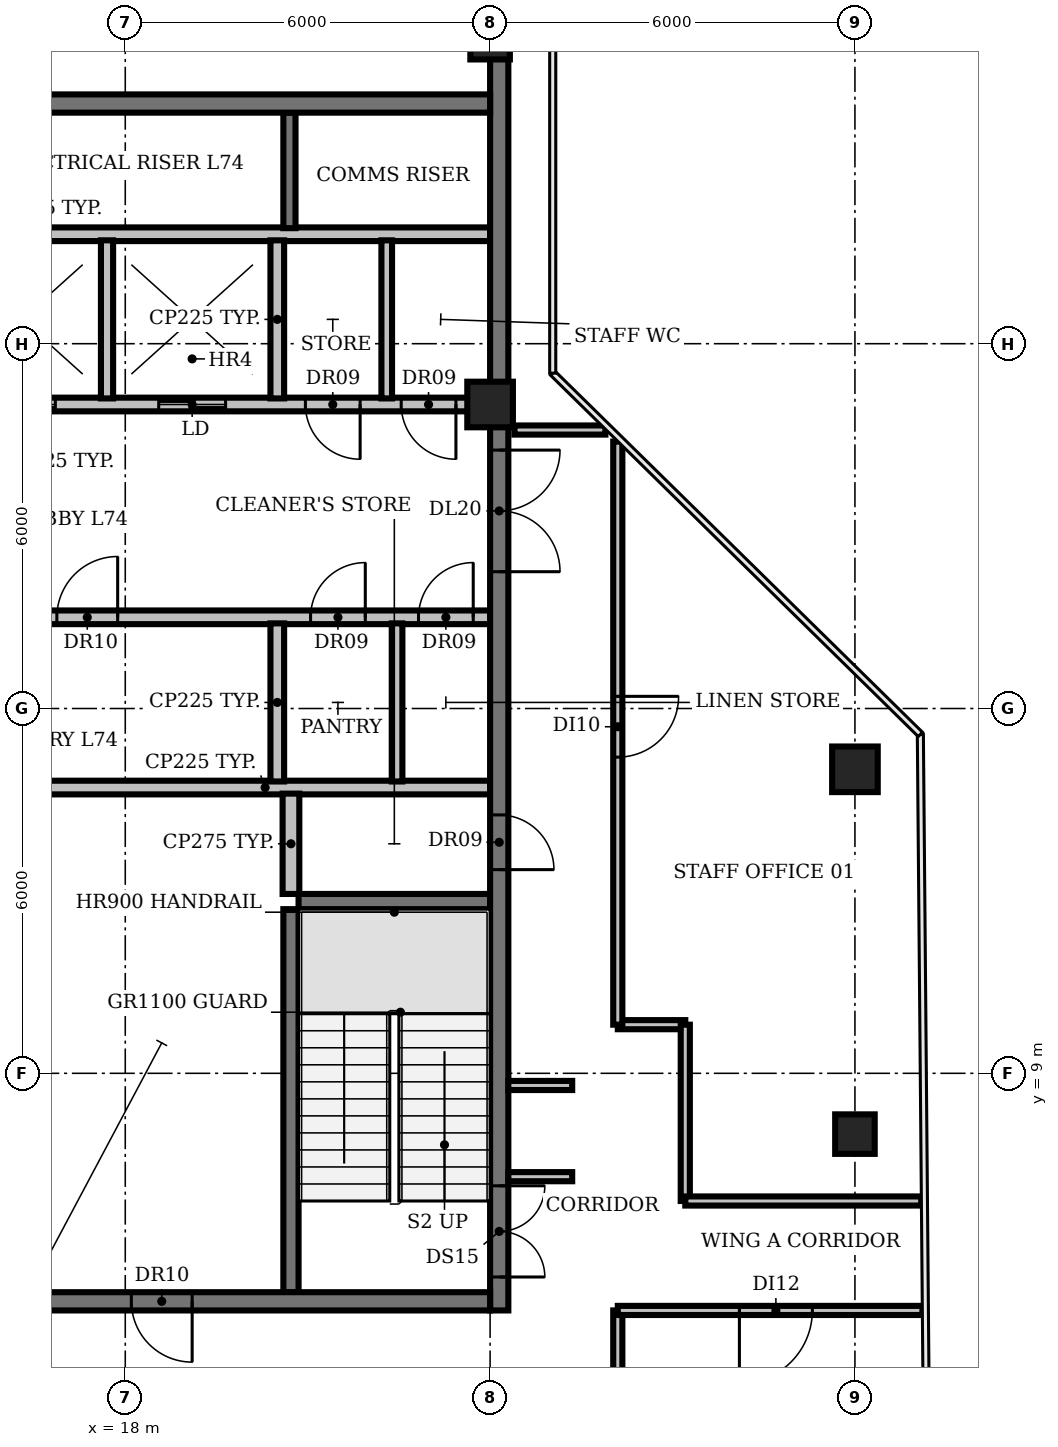
"""IFC4 building model, lengths in metres.
Left out: names, types, materials, properties, quantities, classifications, styles, units other than length and angle.
Written with IfcOpenShell. Run it as: python <this file> out.ifc"""

import sys

from ifc_helpers import new_model, si_unit, direction, frame, frame_2d, origin, origin_2d, place, context, subcontext, project, spatial, rectangle, circle, extrude, element, fill, save


model = new_model("IFC4")
c1 = context("Model", 3, precision=1e-05, world=origin(), true_north=direction((0.0, 1.0)))
c2 = subcontext(c1, "Body", "Model", "MODEL_VIEW")
j1 = project(units=[si_unit("LENGTHUNIT", "METRE"), si_unit("PLANEANGLEUNIT", "RADIAN")], contexts=[c1])
p1 = place(None, origin())
s1 = spatial("IfcSite", under=j1, at=p1, CompositionType="ELEMENT")
p2 = place(p1, origin())
s2 = spatial("IfcBuilding", under=s1, at=p2, CompositionType="ELEMENT")
p3 = place(p2, frame((0.0, 0.0, 331.4)))
s3 = spatial("IfcBuildingStorey", under=s2, at=p3, CompositionType="ELEMENT", Elevation=331.4)
p4 = place(p3, frame((24.0, 20.0, 0.0), z_axis=(0.0, 0.0, 1.0), x_axis=(1.0, 0.0, 0.0)))
e1 = element("IfcColumn", 1, at=p4, inside=s3, PredefinedType="COLUMN", context=c2, shape_type="SweptSolid", body=[
    extrude(circle(Radius=0.375, at=origin_2d()), origin(), (0.0, 0.0, 1.0), 3.9),
])
for number, where, z_axis, x_axis in (
    (2, (24.0, 26.0, 0.0), (0.0, 0.0, 1.0), (1.0, 0.0, 0.0)),
    (3, (30.0, 8.0, 0.0), (0.0, 0.0, 1.0), (1.0, 0.0, 0.0)),
):
    element("IfcColumn", number, at=place(p3, frame(where, z_axis=z_axis, x_axis=x_axis)), inside=s3, PredefinedType="COLUMN", context=c2, shape_type="SweptSolid", body=[
        extrude(rectangle(XDim=0.65, YDim=0.65, at=origin_2d()), origin(), (0.0, 0.0, 1.0), 3.9),
    ])
p5 = place(p3, frame((30.0, 14.0, 0.0), z_axis=(0.0, 0.0, 1.0), x_axis=(1.0, 0.0, 0.0)))
e4 = element("IfcColumn", 4, at=p5, inside=s3, PredefinedType="COLUMN", context=c2, shape_type="SweptSolid", body=[
    extrude(circle(Radius=0.375, at=origin_2d()), origin(), (0.0, 0.0, 1.0), 3.9),
])
p6 = place(p3, frame((20.85, 11.825, 0.0), z_axis=(0.0, 0.0, 1.0), x_axis=(1.0, 0.0, 0.0)))
e5 = element("IfcWall", 5, at=p6, inside=s3, PredefinedType="SHEAR", context=c2, shape_type="SweptSolid", body=[
    extrude(rectangle(XDim=3.15, YDim=0.25, at=frame_2d((1.575, 0.0))), origin(), (0.0, 0.0, 1.0), 3.9),
])
p7 = place(p3, frame((16.6, 13.7, 0.0), z_axis=(0.0, 0.0, 1.0), x_axis=(1.0, 0.0, 0.0)))
e6 = element("IfcWall", 6, at=p7, inside=s3, PredefinedType="PARTITIONING", context=c2, shape_type="SweptSolid", body=[
    extrude(rectangle(XDim=7.4, YDim=0.225, at=frame_2d((3.7, 0.0))), origin(), (0.0, 0.0, 1.0), 3.9),
])
p8 = place(p3, frame((9.4, 16.5, 0.0), z_axis=(0.0, 0.0, 1.0), x_axis=(1.0, 0.0, 0.0)))
e7 = element("IfcWall", 7, at=p8, inside=s3, PredefinedType="PARTITIONING", context=c2, shape_type="SweptSolid", body=[
    extrude(rectangle(XDim=14.6, YDim=0.225, at=frame_2d((7.3, 0.0))), origin(), (0.0, 0.0, 1.0), 3.9),
])
p9 = place(p8, frame((1.9, 0.0, 0.0)))
e8 = element("IfcOpeningElement", 8, at=p9, cuts=e7, PredefinedType="OPENING", context=c2, shape_type="SweptSolid", body=[
    extrude(rectangle(XDim=1.0, YDim=2.1, at=frame_2d((0.5, 1.05))), frame((0.0, 0.123, 0.0), z_axis=(0.0, -1.0, 0.0), x_axis=(1.0, 0.0, 0.0)), (0.0, 0.0, 1.0), 0.245),
])
p10 = place(p8, frame((7.475, 0.0, 0.0)))
e9 = element("IfcOpeningElement", 9, at=p10, cuts=e7, PredefinedType="OPENING", context=c2, shape_type="SweptSolid", body=[
    extrude(rectangle(XDim=1.0, YDim=2.1, at=frame_2d((0.5, 1.05))), frame((0.0, 0.123, 0.0), z_axis=(0.0, -1.0, 0.0), x_axis=(1.0, 0.0, 0.0)), (0.0, 0.0, 1.0), 0.245),
])
p11 = place(p8, frame((11.647, 0.0, 0.0)))
e10 = element("IfcOpeningElement", 10, at=p11, cuts=e7, PredefinedType="OPENING", context=c2, shape_type="SweptSolid", body=[
    extrude(rectangle(XDim=0.9, YDim=2.1, at=frame_2d((0.45, 1.05))), frame((0.0, 0.123, 0.0), z_axis=(0.0, -1.0, 0.0), x_axis=(1.0, 0.0, 0.0)), (0.0, 0.0, 1.0), 0.245),
])
p12 = place(p8, frame((13.423, 0.0, 0.0)))
e11 = element("IfcOpeningElement", 11, at=p12, cuts=e7, PredefinedType="OPENING", context=c2, shape_type="SweptSolid", body=[
    extrude(rectangle(XDim=0.9, YDim=2.1, at=frame_2d((0.45, 1.05))), frame((0.0, 0.123, 0.0), z_axis=(0.0, -1.0, 0.0), x_axis=(1.0, 0.0, 0.0)), (0.0, 0.0, 1.0), 0.245),
])
p13 = place(p3, frame((24.0, 20.0, 0.0), z_axis=(0.0, 0.0, 1.0), x_axis=(-1.0, 0.0, 0.0)))
e12 = element("IfcWall", 12, at=p13, inside=s3, PredefinedType="PARTITIONING", context=c2, shape_type="SweptSolid", body=[
    extrude(rectangle(XDim=14.6, YDim=0.225, at=frame_2d((7.3, 0.0))), origin(), (0.0, 0.0, 1.0), 3.9),
])
p14 = place(p13, frame((12.75, 0.0, 0.0)))
e13 = element("IfcOpeningElement", 13, at=p14, cuts=e12, PredefinedType="OPENING", context=c2, shape_type="SweptSolid", body=[
    extrude(rectangle(XDim=1.1, YDim=2.1, at=frame_2d((0.55, 1.05))), frame((0.0, 0.123, 0.0), z_axis=(0.0, -1.0, 0.0), x_axis=(1.0, 0.0, 0.0)), (0.0, 0.0, 1.0), 0.245),
])
p15 = place(p13, frame((9.95, 0.0, 0.0)))
e14 = element("IfcOpeningElement", 14, at=p15, cuts=e12, PredefinedType="OPENING", context=c2, shape_type="SweptSolid", body=[
    extrude(rectangle(XDim=1.1, YDim=2.1, at=frame_2d((0.55, 1.05))), frame((0.0, 0.123, 0.0), z_axis=(0.0, -1.0, 0.0), x_axis=(1.0, 0.0, 0.0)), (0.0, 0.0, 1.0), 0.245),
])
p16 = place(p13, frame((7.15, 0.0, 0.0)))
e15 = element("IfcOpeningElement", 15, at=p16, cuts=e12, PredefinedType="OPENING", context=c2, shape_type="SweptSolid", body=[
    extrude(rectangle(XDim=1.1, YDim=2.1, at=frame_2d((0.55, 1.05))), frame((0.0, 0.123, 0.0), z_axis=(0.0, -1.0, 0.0), x_axis=(1.0, 0.0, 0.0)), (0.0, 0.0, 1.0), 0.245),
])
p17 = place(p13, frame((4.35, 0.0, 0.0)))
e16 = element("IfcOpeningElement", 16, at=p17, cuts=e12, PredefinedType="OPENING", context=c2, shape_type="SweptSolid", body=[
    extrude(rectangle(XDim=1.1, YDim=2.1, at=frame_2d((0.55, 1.05))), frame((0.0, 0.123, 0.0), z_axis=(0.0, -1.0, 0.0), x_axis=(1.0, 0.0, 0.0)), (0.0, 0.0, 1.0), 0.245),
])
p18 = place(p13, frame((2.137, 0.0, 0.0)))
e17 = element("IfcOpeningElement", 17, at=p18, cuts=e12, PredefinedType="OPENING", context=c2, shape_type="SweptSolid", body=[
    extrude(rectangle(XDim=0.9, YDim=2.1, at=frame_2d((0.45, 1.05))), frame((0.0, 0.123, 0.0), z_axis=(0.0, -1.0, 0.0), x_axis=(1.0, 0.0, 0.0)), (0.0, 0.0, 1.0), 0.245),
])
p19 = place(p13, frame((0.562, 0.0, 0.0)))
e18 = element("IfcOpeningElement", 18, at=p19, cuts=e12, PredefinedType="OPENING", context=c2, shape_type="SweptSolid", body=[
    extrude(rectangle(XDim=0.9, YDim=2.1, at=frame_2d((0.45, 1.05))), frame((0.0, 0.123, 0.0), z_axis=(0.0, -1.0, 0.0), x_axis=(1.0, 0.0, 0.0)), (0.0, 0.0, 1.0), 0.245),
])
p20 = place(p3, frame((9.4, 22.8, 0.0), z_axis=(0.0, 0.0, 1.0), x_axis=(1.0, 0.0, 0.0)))
e19 = element("IfcWall", 19, at=p20, inside=s3, PredefinedType="PARTITIONING", context=c2, shape_type="SweptSolid", body=[
    extrude(rectangle(XDim=14.6, YDim=0.225, at=frame_2d((7.3, 0.0))), origin(), (0.0, 0.0, 1.0), 3.9),
])
p21 = place(p3, frame((17.7, 20.1, 0.0), z_axis=(0.0, 0.0, 1.0), x_axis=(0.0, 1.0, 0.0)))
e20 = element("IfcWall", 20, at=p21, inside=s3, PredefinedType="SOLIDWALL", context=c2, shape_type="SweptSolid", body=[
    extrude(rectangle(XDim=2.6, YDim=0.2, at=frame_2d((1.3, 0.0))), origin(), (0.0, 0.0, 1.0), 3.9),
])
for number, where, z_axis, x_axis in (
    (21, (20.5, 13.8, 0.0), (0.0, 0.0, 1.0), (0.0, 1.0, 0.0)),
    (22, (20.5, 20.1, 0.0), (0.0, 0.0, 1.0), (0.0, 1.0, 0.0)),
):
    element("IfcWall", number, at=place(p3, frame(where, z_axis=z_axis, x_axis=x_axis)), inside=s3, PredefinedType="PARTITIONING", context=c2, shape_type="SweptSolid", body=[
        extrude(rectangle(XDim=2.6, YDim=0.225, at=frame_2d((1.3, 0.0))), origin(), (0.0, 0.0, 1.0), 3.9),
    ])
p22 = place(p3, frame((20.7, 22.9, 0.0), z_axis=(0.0, 0.0, 1.0), x_axis=(0.0, 1.0, 0.0)))
e23 = element("IfcWall", 23, at=p22, inside=s3, PredefinedType="SHEAR", context=c2, shape_type="SweptSolid", body=[
    extrude(rectangle(XDim=1.9, YDim=0.2, at=frame_2d((0.95, 0.0))), origin(), (0.0, 0.0, 1.0), 3.9),
])
p23 = place(p3, frame((20.725, 5.4, 0.0), z_axis=(0.0, 0.0, 1.0), x_axis=(0.0, 1.0, 0.0)))
e24 = element("IfcWall", 24, at=p23, inside=s3, PredefinedType="SHEAR", context=c2, shape_type="SweptSolid", body=[
    extrude(rectangle(XDim=6.3, YDim=0.25, at=frame_2d((3.15, 0.0))), origin(), (0.0, 0.0, 1.0), 3.9),
])
p24 = place(p3, frame((20.725, 11.95, 0.0), z_axis=(0.0, 0.0, 1.0), x_axis=(0.0, 1.0, 0.0)))
e25 = element("IfcWall", 25, at=p24, inside=s3, PredefinedType="PARTITIONING", context=c2, shape_type="SweptSolid", body=[
    extrude(rectangle(XDim=1.65, YDim=0.275, at=frame_2d((0.825, 0.0))), origin(), (0.0, 0.0, 1.0), 3.9),
])
for number, where, z_axis, x_axis in (
    (26, (22.3, 20.1, 0.0), (0.0, 0.0, 1.0), (0.0, 1.0, 0.0)),
    (27, (22.47, 13.8, 0.0), (0.0, 0.0, 1.0), (0.0, 1.0, 0.0)),
):
    element("IfcWall", number, at=place(p3, frame(where, z_axis=z_axis, x_axis=x_axis)), inside=s3, PredefinedType="PARTITIONING", context=c2, shape_type="SweptSolid", body=[
        extrude(rectangle(XDim=2.6, YDim=0.175, at=frame_2d((1.3, 0.0))), origin(), (0.0, 0.0, 1.0), 3.9),
    ])
p25 = place(p3, frame((24.15, 25.705, 0.0), z_axis=(0.0, 0.0, 1.0), x_axis=(0.0, -1.0, 0.0)))
e28 = element("IfcWall", 28, at=p25, inside=s3, PredefinedType="SHEAR", context=c2, shape_type="SweptSolid", body=[
    extrude(rectangle(XDim=20.605, YDim=0.3, at=frame_2d((10.302, 0.0))), origin(), (0.0, 0.0, 1.0), 3.9),
])
p26 = place(p25, frame((18.555, 0.0, 0.0)))
e29 = element("IfcOpeningElement", 29, at=p26, cuts=e28, PredefinedType="OPENING", context=c2, shape_type="SweptSolid", body=[
    extrude(rectangle(XDim=1.5, YDim=2.1, at=frame_2d((0.75, 1.05))), frame((0.0, 0.16, 0.0), z_axis=(0.0, -1.0, 0.0), x_axis=(1.0, 0.0, 0.0)), (0.0, 0.0, 1.0), 0.32),
])
p27 = place(p25, frame((12.455, 0.0, 0.0)))
e30 = element("IfcOpeningElement", 30, at=p27, cuts=e28, PredefinedType="OPENING", context=c2, shape_type="SweptSolid", body=[
    extrude(rectangle(XDim=0.9, YDim=2.1, at=frame_2d((0.45, 1.05))), frame((0.0, 0.16, 0.0), z_axis=(0.0, -1.0, 0.0), x_axis=(1.0, 0.0, 0.0)), (0.0, 0.0, 1.0), 0.32),
])
p28 = place(p25, frame((6.455, 0.0, 0.0)))
e31 = element("IfcOpeningElement", 31, at=p28, cuts=e28, PredefinedType="OPENING", context=c2, shape_type="SweptSolid", body=[
    extrude(rectangle(XDim=2.0, YDim=2.1, at=frame_2d((1.0, 1.05))), frame((0.0, 0.16, 0.0), z_axis=(0.0, -1.0, 0.0), x_axis=(1.0, 0.0, 0.0)), (0.0, 0.0, 1.0), 0.32),
])
p29 = place(p3, frame((24.0, 5.25, 0.0), z_axis=(0.0, 0.0, 1.0), x_axis=(-1.0, 0.0, 0.0)))
e32 = element("IfcWall", 32, at=p29, inside=s3, PredefinedType="SHEAR", context=c2, shape_type="SweptSolid", body=[
    extrude(rectangle(XDim=18.0, YDim=0.3, at=frame_2d((9.0, 0.0))), origin(), (0.0, 0.0, 1.0), 3.9),
])
p30 = place(p29, frame((13.0, 0.0, 0.0)))
e33 = element("IfcOpeningElement", 33, at=p30, cuts=e32, PredefinedType="OPENING", context=c2, shape_type="SweptSolid", body=[
    extrude(rectangle(XDim=1.2, YDim=2.1, at=frame_2d((0.6, 1.05))), frame((0.0, 0.16, 0.0), z_axis=(0.0, -1.0, 0.0), x_axis=(1.0, 0.0, 0.0)), (0.0, 0.0, 1.0), 0.32),
])
p31 = place(p29, frame((4.9, 0.0, 0.0)))
e34 = element("IfcOpeningElement", 34, at=p31, cuts=e32, PredefinedType="OPENING", context=c2, shape_type="SweptSolid", body=[
    extrude(rectangle(XDim=1.0, YDim=2.1, at=frame_2d((0.5, 1.05))), frame((0.0, 0.16, 0.0), z_axis=(0.0, -1.0, 0.0), x_axis=(1.0, 0.0, 0.0)), (0.0, 0.0, 1.0), 0.32),
])
p32 = place(p3, frame((6.0, 24.95, 0.0), z_axis=(0.0, 0.0, 1.0), x_axis=(1.0, 0.0, 0.0)))
e35 = element("IfcWall", 35, at=p32, inside=s3, PredefinedType="SHEAR", context=c2, shape_type="SweptSolid", body=[
    extrude(rectangle(XDim=18.0, YDim=0.3, at=frame_2d((9.0, 0.0))), origin(), (0.0, 0.0, 1.0), 3.9),
])
for number, where, z_axis, x_axis in (
    (36, (24.3, 7.3, 0.0), (0.0, 0.0, 1.0), (1.0, 0.0, 0.0)),
    (37, (24.3, 8.8, 0.0), (0.0, 0.0, 1.0), (1.0, 0.0, 0.0)),
):
    element("IfcWall", number, at=place(p3, frame(where, z_axis=z_axis, x_axis=x_axis)), inside=s3, PredefinedType="PARTITIONING", context=c2, shape_type="SweptSolid", body=[
        extrude(rectangle(XDim=1.05, YDim=0.15, at=frame_2d((0.525, 0.0))), origin(), (0.0, 0.0, 1.0), 2.48),
    ])
p33 = place(p3, frame((24.4, 19.58, 0.0), z_axis=(0.0, 0.0, 1.0), x_axis=(1.0, 0.0, 0.0)))
e38 = element("IfcWall", 38, at=p33, inside=s3, PredefinedType="PARTITIONING", context=c2, shape_type="SweptSolid", body=[
    extrude(rectangle(XDim=1.497, YDim=0.15, at=frame_2d((0.748, 0.0))), origin(), (0.0, 0.0, 1.0), 2.48),
])
p34 = place(p3, frame((26.1, 2.1, 0.0), z_axis=(0.0, 0.0, 1.0), x_axis=(0.0, 1.0, 0.0)))
e39 = element("IfcWall", 39, at=p34, inside=s3, PredefinedType="PARTITIONING", context=c2, shape_type="SweptSolid", body=[
    extrude(rectangle(XDim=3.0, YDim=0.15, at=frame_2d((1.5, 0.0))), origin(), (0.0, 0.0, 1.0), 2.48),
])
p35 = place(p3, frame((26.1, 9.8, 0.0), z_axis=(0.0, 0.0, 1.0), x_axis=(1.0, 0.0, 0.0)))
e40 = element("IfcWall", 40, at=p35, inside=s3, PredefinedType="PARTITIONING", context=c2, shape_type="SweptSolid", body=[
    extrude(rectangle(XDim=1.11, YDim=0.15, at=frame_2d((0.555, 0.0))), origin(), (0.0, 0.0, 1.0), 2.48),
])
p36 = place(p3, frame((26.1, 19.39, 0.0), z_axis=(0.0, 0.0, 1.0), x_axis=(0.0, -1.0, 0.0)))
e41 = element("IfcWall", 41, at=p36, inside=s3, PredefinedType="PARTITIONING", context=c2, shape_type="SweptSolid", body=[
    extrude(rectangle(XDim=9.59, YDim=0.15, at=frame_2d((4.795, 0.0))), origin(), (0.0, 0.0, 1.0), 2.48),
])
p37 = place(p36, frame((4.19, 0.0, 0.0)))
e42 = element("IfcOpeningElement", 42, at=p37, cuts=e41, PredefinedType="OPENING", context=c2, shape_type="SweptSolid", body=[
    extrude(rectangle(XDim=1.0, YDim=2.1, at=frame_2d((0.5, 1.05))), frame((0.0, 0.085, 0.0), z_axis=(0.0, -1.0, 0.0), x_axis=(1.0, 0.0, 0.0)), (0.0, 0.0, 1.0), 0.17),
])
p38 = place(p3, frame((27.21, 6.9, 0.0), z_axis=(0.0, 0.0, 1.0), x_axis=(0.0, 1.0, 0.0)))
e43 = element("IfcWall", 43, at=p38, inside=s3, PredefinedType="PARTITIONING", context=c2, shape_type="SweptSolid", body=[
    extrude(rectangle(XDim=2.9, YDim=0.15, at=frame_2d((1.45, 0.0))), origin(), (0.0, 0.0, 1.0), 2.48),
])
p39 = place(p3, frame((27.21, 6.9, 0.0), z_axis=(0.0, 0.0, 1.0), x_axis=(1.0, 0.0, 0.0)))
e44 = element("IfcWall", 44, at=p39, inside=s3, PredefinedType="PARTITIONING", context=c2, shape_type="SweptSolid", body=[
    extrude(rectangle(XDim=3.88, YDim=0.15, at=frame_2d((1.94, 0.0))), origin(), (0.0, 0.0, 1.0), 2.48),
])
p40 = place(p3, frame((31.11, 5.1, 0.0), z_axis=(0.0, 0.0, 1.0), x_axis=(-1.0, 0.0, 0.0)))
e45 = element("IfcWall", 45, at=p40, inside=s3, PredefinedType="PARTITIONING", context=c2, shape_type="SweptSolid", body=[
    extrude(rectangle(XDim=5.01, YDim=0.15, at=frame_2d((2.505, 0.0))), origin(), (0.0, 0.0, 1.0), 2.48),
])
p41 = place(p40, frame((1.81, 0.0, 0.0)))
e46 = element("IfcOpeningElement", 46, at=p41, cuts=e45, PredefinedType="OPENING", context=c2, shape_type="SweptSolid", body=[
    extrude(rectangle(XDim=1.2, YDim=2.1, at=frame_2d((0.6, 1.05))), frame((0.0, 0.085, 0.0), z_axis=(0.0, -1.0, 0.0), x_axis=(1.0, 0.0, 0.0)), (0.0, 0.0, 1.0), 0.17),
])
p42 = place(p10, origin())
e47 = element("IfcDoor", 47, at=p42, inside=s3, OperationType="SINGLE_SWING_RIGHT", PredefinedType="DOOR", context=c2, shape_type="SweptSolid", body=[
    extrude(rectangle(XDim=1.0, YDim=2.1, at=frame_2d((0.5, 1.05))), frame((0.0, 0.025, 0.0), z_axis=(0.0, -1.0, 0.0), x_axis=(1.0, 0.0, 0.0)), (0.0, 0.0, 1.0), 0.05),
])
fill(e9, e47)
p43 = place(p11, origin())
e48 = element("IfcDoor", 48, at=p43, inside=s3, OperationType="SINGLE_SWING_RIGHT", PredefinedType="DOOR", context=c2, shape_type="SweptSolid", body=[
    extrude(rectangle(XDim=0.9, YDim=2.1, at=frame_2d((0.45, 1.05))), frame((0.0, 0.025, 0.0), z_axis=(0.0, -1.0, 0.0), x_axis=(1.0, 0.0, 0.0)), (0.0, 0.0, 1.0), 0.05),
])
fill(e10, e48)
p44 = place(p12, origin())
e49 = element("IfcDoor", 49, at=p44, inside=s3, OperationType="SINGLE_SWING_RIGHT", PredefinedType="DOOR", context=c2, shape_type="SweptSolid", body=[
    extrude(rectangle(XDim=0.9, YDim=2.1, at=frame_2d((0.45, 1.05))), frame((0.0, 0.025, 0.0), z_axis=(0.0, -1.0, 0.0), x_axis=(1.0, 0.0, 0.0)), (0.0, 0.0, 1.0), 0.05),
])
fill(e11, e49)
p45 = place(p16, origin())
e50 = element("IfcDoor", 50, at=p45, inside=s3, OperationType="DOUBLE_DOOR_SLIDING", PredefinedType="DOOR", context=c2, shape_type="SweptSolid", body=[
    extrude(rectangle(XDim=1.1, YDim=2.1, at=frame_2d((0.55, 1.05))), frame((0.0, 0.025, 0.0), z_axis=(0.0, -1.0, 0.0), x_axis=(1.0, 0.0, 0.0)), (0.0, 0.0, 1.0), 0.05),
])
fill(e15, e50)
p46 = place(p17, origin())
e51 = element("IfcDoor", 51, at=p46, inside=s3, OperationType="DOUBLE_DOOR_SLIDING", PredefinedType="DOOR", context=c2, shape_type="SweptSolid", body=[
    extrude(rectangle(XDim=1.1, YDim=2.1, at=frame_2d((0.55, 1.05))), frame((0.0, 0.025, 0.0), z_axis=(0.0, -1.0, 0.0), x_axis=(1.0, 0.0, 0.0)), (0.0, 0.0, 1.0), 0.05),
])
fill(e16, e51)
p47 = place(p18, origin())
e52 = element("IfcDoor", 52, at=p47, inside=s3, OperationType="SINGLE_SWING_LEFT", PredefinedType="DOOR", context=c2, shape_type="SweptSolid", body=[
    extrude(rectangle(XDim=0.9, YDim=2.1, at=frame_2d((0.45, 1.05))), frame((0.0, 0.025, 0.0), z_axis=(0.0, -1.0, 0.0), x_axis=(1.0, 0.0, 0.0)), (0.0, 0.0, 1.0), 0.05),
])
fill(e17, e52)
p48 = place(p19, origin())
e53 = element("IfcDoor", 53, at=p48, inside=s3, OperationType="SINGLE_SWING_LEFT", PredefinedType="DOOR", context=c2, shape_type="SweptSolid", body=[
    extrude(rectangle(XDim=0.9, YDim=2.1, at=frame_2d((0.45, 1.05))), frame((0.0, 0.025, 0.0), z_axis=(0.0, -1.0, 0.0), x_axis=(1.0, 0.0, 0.0)), (0.0, 0.0, 1.0), 0.05),
])
fill(e18, e53)
p49 = place(p26, origin())
e54 = element("IfcDoor", 54, at=p49, inside=s3, OperationType="DOUBLE_DOOR_SINGLE_SWING", PredefinedType="DOOR", context=c2, shape_type="SweptSolid", body=[
    extrude(rectangle(XDim=1.5, YDim=2.1, at=frame_2d((0.75, 1.05))), frame((0.0, 0.025, 0.0), z_axis=(0.0, -1.0, 0.0), x_axis=(1.0, 0.0, 0.0)), (0.0, 0.0, 1.0), 0.05),
])
fill(e29, e54)
p50 = place(p27, origin())
e55 = element("IfcDoor", 55, at=p50, inside=s3, OperationType="SINGLE_SWING_RIGHT", PredefinedType="DOOR", context=c2, shape_type="SweptSolid", body=[
    extrude(rectangle(XDim=0.9, YDim=2.1, at=frame_2d((0.45, 1.05))), frame((0.0, 0.025, 0.0), z_axis=(0.0, -1.0, 0.0), x_axis=(1.0, 0.0, 0.0)), (0.0, 0.0, 1.0), 0.05),
])
fill(e30, e55)
p51 = place(p28, origin())
e56 = element("IfcDoor", 56, at=p51, inside=s3, OperationType="DOUBLE_DOOR_SINGLE_SWING", PredefinedType="DOOR", context=c2, shape_type="SweptSolid", body=[
    extrude(rectangle(XDim=2.0, YDim=2.1, at=frame_2d((1.0, 1.05))), frame((0.0, 0.025, 0.0), z_axis=(0.0, -1.0, 0.0), x_axis=(1.0, 0.0, 0.0)), (0.0, 0.0, 1.0), 0.05),
])
fill(e31, e56)
p52 = place(p31, origin())
e57 = element("IfcDoor", 57, at=p52, inside=s3, OperationType="SINGLE_SWING_LEFT", PredefinedType="DOOR", context=c2, shape_type="SweptSolid", body=[
    extrude(rectangle(XDim=1.0, YDim=2.1, at=frame_2d((0.5, 1.05))), frame((0.0, 0.025, 0.0), z_axis=(0.0, -1.0, 0.0), x_axis=(1.0, 0.0, 0.0)), (0.0, 0.0, 1.0), 0.05),
])
fill(e34, e57)
p53 = place(p37, origin())
e58 = element("IfcDoor", 58, at=p53, inside=s3, OperationType="SINGLE_SWING_LEFT", PredefinedType="DOOR", context=c2, shape_type="SweptSolid", body=[
    extrude(rectangle(XDim=1.0, YDim=2.1, at=frame_2d((0.5, 1.05))), frame((0.0, 0.025, 0.0), z_axis=(0.0, -1.0, 0.0), x_axis=(1.0, 0.0, 0.0)), (0.0, 0.0, 1.0), 0.05),
])
fill(e42, e58)
p54 = place(p41, origin())
e59 = element("IfcDoor", 59, at=p54, inside=s3, OperationType="SINGLE_SWING_RIGHT", PredefinedType="DOOR", context=c2, shape_type="SweptSolid", body=[
    extrude(rectangle(XDim=1.2, YDim=2.1, at=frame_2d((0.6, 1.05))), frame((0.0, 0.025, 0.0), z_axis=(0.0, -1.0, 0.0), x_axis=(1.0, 0.0, 0.0)), (0.0, 0.0, 1.0), 0.05),
])
fill(e46, e59)
save(model, sys.argv[1])
